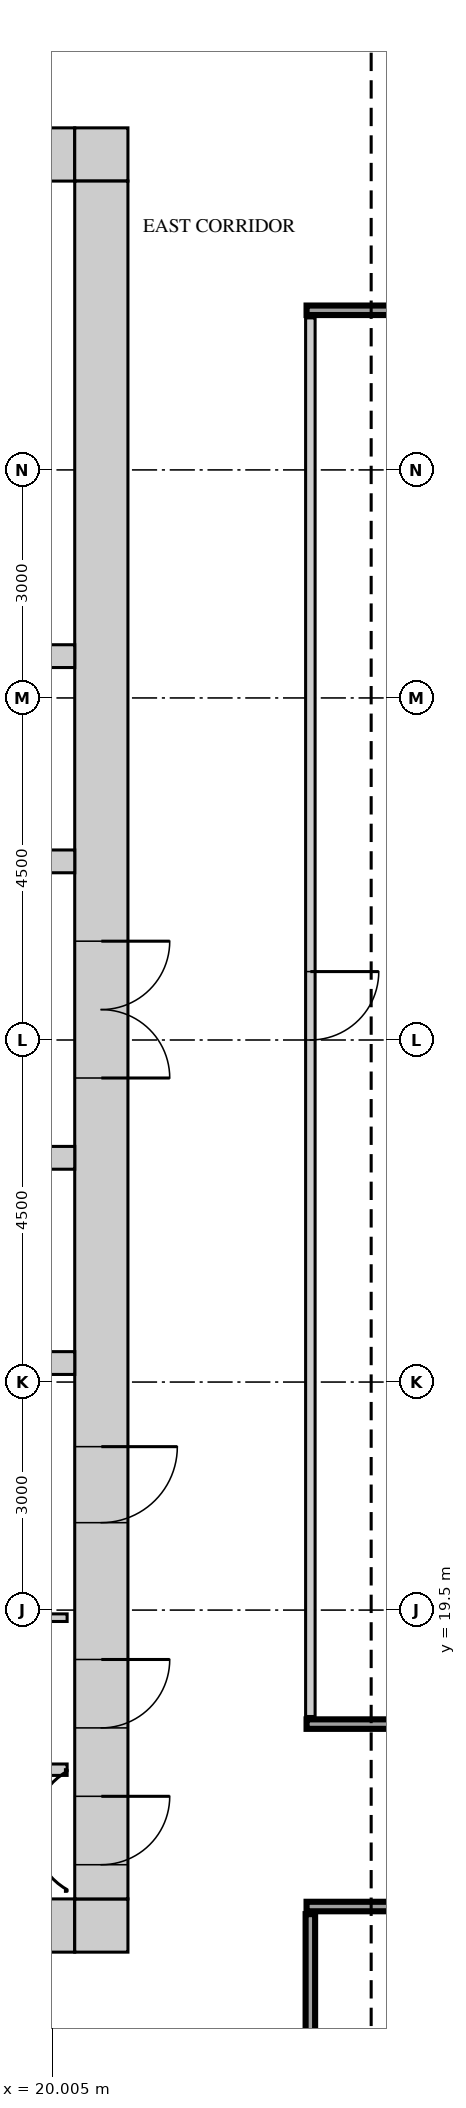
"""IFC4 building model, lengths in metres.
Left out: names, types, materials, properties, quantities, classifications, styles, units other than length and angle.
Written with IfcOpenShell. Run it as: python <this file> out.ifc"""

import sys

from ifc_helpers import new_model, si_unit, direction, frame, frame_2d, origin, place, context, subcontext, project, spatial, rectangle, extrude, source, transform, mapped, element, fill, save


model = new_model("IFC4")
c1 = context("Model", 3, precision=1e-05, world=origin(), true_north=direction((0.0, 1.0)))
c2 = subcontext(c1, "Body", "Model", "MODEL_VIEW")
j1 = project(units=[si_unit("LENGTHUNIT", "METRE"), si_unit("PLANEANGLEUNIT", "RADIAN")], contexts=[c1])
p1 = place(None, origin())
s1 = spatial("IfcSite", under=j1, at=p1, CompositionType="ELEMENT")
p2 = place(p1, origin())
s2 = spatial("IfcBuilding", under=s1, at=p2, CompositionType="ELEMENT")
p3 = place(p2, frame((0.0, 0.0, 262.2)))
s3 = spatial("IfcBuildingStorey", under=s2, at=p3, CompositionType="ELEMENT", Elevation=262.2)
m1 = source(origin(), c2, "Body", "SweptSolid", [
    extrude(rectangle(XDim=13.6, YDim=0.7, at=frame_2d((6.8, 0.0))), origin(), (0.0, 0.0, 1.0), 3.75),
])
p4 = place(p3, frame((6.7, 38.65, 0.0), z_axis=(0.0, 0.0, 1.0), x_axis=(1.0, 0.0, 0.0)))
e1 = element("IfcWall", 1, at=p4, inside=s3, PredefinedType="SHEAR", context=c2, shape_type="MappedRepresentation", body=[
    mapped(m1, transform((0.0, 0.0, 0.0))),
])
m2 = source(origin(), c2, "Body", "SweptSolid", [
    extrude(rectangle(XDim=0.9, YDim=2.1, at=frame_2d((0.45, 1.05))), frame((0.0, 0.36, 0.0), z_axis=(0.0, -1.0, 0.0), x_axis=(1.0, 0.0, 0.0)), (0.0, 0.0, 1.0), 0.72),
])
p5 = place(p4, frame((1.85, 0.0, 0.0)))
e2 = element("IfcOpeningElement", 2, at=p5, cuts=e1, PredefinedType="OPENING", context=c2, shape_type="MappedRepresentation", body=[
    mapped(m2, transform((0.0, 0.0, 0.0))),
])
p6 = place(p4, frame((8.55, 0.0, 0.0)))
e3 = element("IfcOpeningElement", 3, at=p6, cuts=e1, PredefinedType="OPENING", context=c2, shape_type="MappedRepresentation", body=[
    mapped(m2, transform((0.0, 0.0, 0.0))),
])
m3 = source(origin(), c2, "Body", "SweptSolid", [
    extrude(rectangle(XDim=0.7, YDim=0.7, at=frame_2d((0.35, 0.0))), origin(), (0.0, 0.0, 1.0), 3.75),
])
p7 = place(p3, frame((20.3, 38.65, 0.0), z_axis=(0.0, 0.0, 1.0), x_axis=(1.0, 0.0, 0.0)))
e4 = element("IfcWall", 4, at=p7, inside=s3, PredefinedType="SHEAR", context=c2, shape_type="MappedRepresentation", body=[
    mapped(m3, transform((0.0, 0.0, 0.0))),
])
p8 = place(p3, frame((6.7, 15.35, 0.0), z_axis=(0.0, 0.0, 1.0), x_axis=(1.0, 0.0, 0.0)))
e5 = element("IfcWall", 5, at=p8, inside=s3, PredefinedType="SHEAR", context=c2, shape_type="MappedRepresentation", body=[
    mapped(m1, transform((0.0, 0.0, 0.0))),
])
m4 = source(origin(), c2, "Body", "SweptSolid", [
    extrude(rectangle(XDim=1.2, YDim=2.1, at=frame_2d((0.6, 1.05))), frame((0.0, 0.36, 0.0), z_axis=(0.0, -1.0, 0.0), x_axis=(1.0, 0.0, 0.0)), (0.0, 0.0, 1.0), 0.72),
])
p9 = place(p8, frame((5.5, 0.0, 0.0)))
e6 = element("IfcOpeningElement", 6, at=p9, cuts=e5, PredefinedType="OPENING", context=c2, shape_type="MappedRepresentation", body=[
    mapped(m4, transform((0.0, 0.0, 0.0))),
])
p10 = place(p8, frame((2.15, 0.0, 0.0)))
e7 = element("IfcOpeningElement", 7, at=p10, cuts=e5, PredefinedType="OPENING", context=c2, shape_type="MappedRepresentation", body=[
    mapped(m4, transform((0.0, 0.0, 0.0))),
])
m5 = source(origin(), c2, "Body", "SweptSolid", [
    extrude(rectangle(XDim=1.0, YDim=2.1, at=frame_2d((0.5, 1.05))), frame((0.0, 0.36, 0.0), z_axis=(0.0, -1.0, 0.0), x_axis=(1.0, 0.0, 0.0)), (0.0, 0.0, 1.0), 0.72),
])
p11 = place(p8, frame((8.0, 0.0, 0.0)))
e8 = element("IfcOpeningElement", 8, at=p11, cuts=e5, PredefinedType="OPENING", context=c2, shape_type="MappedRepresentation", body=[
    mapped(m5, transform((0.0, 0.0, 0.0))),
])
p12 = place(p3, frame((20.3, 15.35, 0.0), z_axis=(0.0, 0.0, 1.0), x_axis=(1.0, 0.0, 0.0)))
e9 = element("IfcWall", 9, at=p12, inside=s3, PredefinedType="SHEAR", context=c2, shape_type="MappedRepresentation", body=[
    mapped(m3, transform((0.0, 0.0, 0.0))),
])
m6 = source(origin(), c2, "Body", "SweptSolid", [
    extrude(rectangle(XDim=22.6, YDim=0.7, at=frame_2d((11.3, 0.0))), origin(), (0.0, 0.0, 1.0), 3.75),
])
p13 = place(p3, frame((20.65, 15.7, 0.0), z_axis=(0.0, 0.0, 1.0), x_axis=(0.0, 1.0, 0.0)))
e10 = element("IfcWall", 10, at=p13, inside=s3, PredefinedType="SHEAR", context=c2, shape_type="MappedRepresentation", body=[
    mapped(m6, transform((0.0, 0.0, 0.0))),
])
m7 = source(origin(), c2, "Body", "SweptSolid", [
    extrude(rectangle(XDim=1.8, YDim=2.1, at=frame_2d((0.9, 1.05))), frame((0.0, 0.36, 0.0), z_axis=(0.0, -1.0, 0.0), x_axis=(1.0, 0.0, 0.0)), (0.0, 0.0, 1.0), 0.72),
])
p14 = place(p13, frame((10.8, 0.0, 0.0)))
e11 = element("IfcOpeningElement", 11, at=p14, cuts=e10, PredefinedType="OPENING", context=c2, shape_type="MappedRepresentation", body=[
    mapped(m7, transform((0.0, 0.0, 0.0))),
])
p15 = place(p13, frame((0.45, 0.0, 0.0)))
e12 = element("IfcOpeningElement", 12, at=p15, cuts=e10, PredefinedType="OPENING", context=c2, shape_type="MappedRepresentation", body=[
    mapped(m2, transform((0.0, 0.0, 0.0))),
])
p16 = place(p13, frame((2.25, 0.0, 0.0)))
e13 = element("IfcOpeningElement", 13, at=p16, cuts=e10, PredefinedType="OPENING", context=c2, shape_type="MappedRepresentation", body=[
    mapped(m2, transform((0.0, 0.0, 0.0))),
])
p17 = place(p13, frame((4.95, 0.0, 0.0)))
e14 = element("IfcOpeningElement", 14, at=p17, cuts=e10, PredefinedType="OPENING", context=c2, shape_type="MappedRepresentation", body=[
    mapped(m5, transform((0.0, 0.0, 0.0))),
])
m8 = source(origin(), c2, "Body", "SweptSolid", [
    extrude(rectangle(XDim=13.6, YDim=0.3, at=frame_2d((6.8, 0.0))), origin(), (0.0, 0.0, 1.0), 3.75),
])
for number, where, z_axis, x_axis in (
    (15, (6.7, 22.75, 0.0), (0.0, 0.0, 1.0), (1.0, 0.0, 0.0)),
    (16, (6.7, 32.05, 0.0), (0.0, 0.0, 1.0), (1.0, 0.0, 0.0)),
):
    element("IfcWall", number, at=place(p3, frame(where, z_axis=z_axis, x_axis=x_axis)), inside=s3, PredefinedType="STANDARD", context=c2, shape_type="MappedRepresentation", body=[
        mapped(m8, transform((0.0, 0.0, 0.0))),
    ])
p18 = place(p3, frame((6.7, 29.35, 0.0), z_axis=(0.0, 0.0, 1.0), x_axis=(1.0, 0.0, 0.0)))
e17 = element("IfcWall", 17, at=p18, inside=s3, PredefinedType="STANDARD", context=c2, shape_type="MappedRepresentation", body=[
    mapped(m8, transform((0.0, 0.0, 0.0))),
])
m9 = source(origin(), c2, "Body", "SweptSolid", [
    extrude(rectangle(XDim=1.2, YDim=2.1, at=frame_2d((0.6, 1.05))), frame((0.0, 0.16, 0.0), z_axis=(0.0, -1.0, 0.0), x_axis=(1.0, 0.0, 0.0)), (0.0, 0.0, 1.0), 0.32),
])
p19 = place(p18, frame((1.05, 0.0, 0.0)))
e18 = element("IfcOpeningElement", 18, at=p19, cuts=e17, PredefinedType="OPENING", context=c2, shape_type="MappedRepresentation", body=[
    mapped(m9, transform((0.0, 0.0, 0.0))),
])
p20 = place(p18, frame((3.6, 0.0, 0.0)))
e19 = element("IfcOpeningElement", 19, at=p20, cuts=e17, PredefinedType="OPENING", context=c2, shape_type="MappedRepresentation", body=[
    mapped(m9, transform((0.0, 0.0, 0.0))),
])
p21 = place(p18, frame((6.15, 0.0, 0.0)))
e20 = element("IfcOpeningElement", 20, at=p21, cuts=e17, PredefinedType="OPENING", context=c2, shape_type="MappedRepresentation", body=[
    mapped(m9, transform((0.0, 0.0, 0.0))),
])
p22 = place(p3, frame((6.7, 25.45, 0.0), z_axis=(0.0, 0.0, 1.0), x_axis=(1.0, 0.0, 0.0)))
e21 = element("IfcWall", 21, at=p22, inside=s3, PredefinedType="STANDARD", context=c2, shape_type="MappedRepresentation", body=[
    mapped(m8, transform((0.0, 0.0, 0.0))),
])
p23 = place(p22, frame((1.05, 0.0, 0.0)))
e22 = element("IfcOpeningElement", 22, at=p23, cuts=e21, PredefinedType="OPENING", context=c2, shape_type="MappedRepresentation", body=[
    mapped(m9, transform((0.0, 0.0, 0.0))),
])
p24 = place(p22, frame((3.6, 0.0, 0.0)))
e23 = element("IfcOpeningElement", 23, at=p24, cuts=e21, PredefinedType="OPENING", context=c2, shape_type="MappedRepresentation", body=[
    mapped(m9, transform((0.0, 0.0, 0.0))),
])
p25 = place(p22, frame((6.15, 0.0, 0.0)))
e24 = element("IfcOpeningElement", 24, at=p25, cuts=e21, PredefinedType="OPENING", context=c2, shape_type="MappedRepresentation", body=[
    mapped(m9, transform((0.0, 0.0, 0.0))),
])
m10 = source(origin(), c2, "Body", "SweptSolid", [
    extrude(rectangle(XDim=10.85, YDim=0.125, at=frame_2d((5.425, 0.0))), origin(), (0.0, 0.0, 1.0), 3.8),
])
p26 = place(p3, frame((23.4, 4.65, 0.0), z_axis=(0.0, 0.0, 1.0), x_axis=(0.0, 1.0, 0.0)))
e25 = element("IfcWall", 25, at=p26, inside=s3, PredefinedType="PARTITIONING", context=c2, shape_type="MappedRepresentation", body=[
    mapped(m10, transform((0.0, 0.0, 0.0))),
])
m11 = source(origin(), c2, "Body", "SweptSolid", [
    extrude(rectangle(XDim=0.9, YDim=2.1, at=frame_2d((0.45, 1.05))), frame((0.0, 0.073, 0.0), z_axis=(0.0, -1.0, 0.0), x_axis=(1.0, 0.0, 0.0)), (0.0, 0.0, 1.0), 0.145),
])
p27 = place(p26, frame((4.5, 0.0, 0.0)))
e26 = element("IfcOpeningElement", 26, at=p27, cuts=e25, PredefinedType="OPENING", context=c2, shape_type="MappedRepresentation", body=[
    mapped(m11, transform((0.0, 0.0, 0.0))),
])
m12 = source(origin(), c2, "Body", "SweptSolid", [
    extrude(rectangle(XDim=26.0, YDim=0.125, at=frame_2d((13.0, 0.0))), origin(), (0.0, 0.0, 1.0), 3.8),
])
p28 = place(p3, frame((23.35, 15.6, 0.0), z_axis=(0.0, 0.0, 1.0), x_axis=(1.0, 0.0, 0.0)))
e27 = element("IfcWall", 27, at=p28, inside=s3, PredefinedType="PARTITIONING", context=c2, shape_type="MappedRepresentation", body=[
    mapped(m12, transform((0.0, 0.0, 0.0))),
])
m13 = source(origin(), c2, "Body", "SweptSolid", [
    extrude(rectangle(XDim=1.2, YDim=2.1, at=frame_2d((0.6, 1.05))), frame((0.0, 0.073, 0.0), z_axis=(0.0, -1.0, 0.0), x_axis=(1.0, 0.0, 0.0)), (0.0, 0.0, 1.0), 0.145),
])
p29 = place(p28, frame((16.55, 0.0, 0.0)))
e28 = element("IfcOpeningElement", 28, at=p29, cuts=e27, PredefinedType="OPENING", context=c2, shape_type="MappedRepresentation", body=[
    mapped(m13, transform((0.0, 0.0, 0.0))),
])
m14 = source(origin(), c2, "Body", "SweptSolid", [
    extrude(rectangle(XDim=4.0, YDim=0.15, at=frame_2d((2.0, 0.0))), origin(), (0.0, 0.0, 1.0), 3.8),
])
p30 = place(p3, frame((16.2, 17.4, 0.0), z_axis=(0.0, 0.0, 1.0), x_axis=(1.0, 0.0, 0.0)))
e29 = element("IfcWall", 29, at=p30, inside=s3, PredefinedType="PARTITIONING", context=c2, shape_type="MappedRepresentation", body=[
    mapped(m14, transform((0.0, 0.0, 0.0))),
])
p31 = place(p3, frame((23.35, 18.0, 0.0), z_axis=(0.0, 0.0, 1.0), x_axis=(1.0, 0.0, 0.0)))
e30 = element("IfcWall", 30, at=p31, inside=s3, PredefinedType="PARTITIONING", context=c2, shape_type="MappedRepresentation", body=[
    mapped(m12, transform((0.0, 0.0, 0.0))),
])
p32 = place(p31, frame((8.5, 0.0, 0.0)))
e31 = element("IfcOpeningElement", 31, at=p32, cuts=e30, PredefinedType="OPENING", context=c2, shape_type="MappedRepresentation", body=[
    mapped(m13, transform((0.0, 0.0, 0.0))),
])
p33 = place(p31, frame((15.3, 0.0, 0.0)))
e32 = element("IfcOpeningElement", 32, at=p33, cuts=e30, PredefinedType="OPENING", context=c2, shape_type="MappedRepresentation", body=[
    mapped(m11, transform((0.0, 0.0, 0.0))),
])
p34 = place(p31, frame((21.8, 0.0, 0.0)))
e33 = element("IfcOpeningElement", 33, at=p34, cuts=e30, PredefinedType="OPENING", context=c2, shape_type="MappedRepresentation", body=[
    mapped(m13, transform((0.0, 0.0, 0.0))),
])
m15 = source(origin(), c2, "Body", "SweptSolid", [
    extrude(rectangle(XDim=18.4, YDim=0.125, at=frame_2d((9.2, 0.0))), origin(), (0.0, 0.0, 1.0), 3.8),
])
p35 = place(p3, frame((23.4, 18.1, 0.0), z_axis=(0.0, 0.0, 1.0), x_axis=(0.0, 1.0, 0.0)))
e34 = element("IfcWall", 34, at=p35, inside=s3, PredefinedType="PARTITIONING", context=c2, shape_type="MappedRepresentation", body=[
    mapped(m15, transform((0.0, 0.0, 0.0))),
])
p36 = place(p35, frame((8.9, 0.0, 0.0)))
e35 = element("IfcOpeningElement", 35, at=p36, cuts=e34, PredefinedType="OPENING", context=c2, shape_type="MappedRepresentation", body=[
    mapped(m11, transform((0.0, 0.0, 0.0))),
])
m16 = source(origin(), c2, "Body", "SweptSolid", [
    extrude(rectangle(XDim=4.1, YDim=0.1, at=frame_2d((2.05, 0.0))), origin(), (0.0, 0.0, 1.0), 3.8),
])
p37 = place(p3, frame((16.1, 19.4, 0.0), z_axis=(0.0, 0.0, 1.0), x_axis=(1.0, 0.0, 0.0)))
e36 = element("IfcWall", 36, at=p37, inside=s3, PredefinedType="PARTITIONING", context=c2, shape_type="MappedRepresentation", body=[
    mapped(m16, transform((0.0, 0.0, 0.0))),
])
p38 = place(p3, frame((23.35, 36.6, 0.0), z_axis=(0.0, 0.0, 1.0), x_axis=(1.0, 0.0, 0.0)))
e37 = element("IfcWall", 37, at=p38, inside=s3, PredefinedType="PARTITIONING", context=c2, shape_type="MappedRepresentation", body=[
    mapped(m12, transform((0.0, 0.0, 0.0))),
])
m17 = source(origin(), c2, "Body", "SweptSolid", [
    extrude(rectangle(XDim=1.8, YDim=2.1, at=frame_2d((0.9, 1.05))), frame((0.0, 0.3, 0.0), z_axis=(0.0, -1.0, 0.0), x_axis=(1.0, 0.0, 0.0)), (0.0, 0.0, 1.0), 0.6),
])
p39 = place(p14, origin())
e38 = element("IfcDoor", 38, at=p39, inside=s3, OperationType="DOUBLE_DOOR_SINGLE_SWING", PredefinedType="DOOR", context=c2, shape_type="MappedRepresentation", body=[
    mapped(m17, transform((0.0, 0.0, 0.0))),
])
fill(e11, e38)
m18 = source(origin(), c2, "Body", "SweptSolid", [
    extrude(rectangle(XDim=0.9, YDim=2.1, at=frame_2d((0.45, 1.05))), frame((0.0, 0.3, 0.0), z_axis=(0.0, -1.0, 0.0), x_axis=(1.0, 0.0, 0.0)), (0.0, 0.0, 1.0), 0.6),
])
p40 = place(p15, origin())
e39 = element("IfcDoor", 39, at=p40, inside=s3, OperationType="SINGLE_SWING_RIGHT", PredefinedType="DOOR", context=c2, shape_type="MappedRepresentation", body=[
    mapped(m18, transform((0.0, 0.0, 0.0))),
])
fill(e12, e39)
p41 = place(p16, origin())
e40 = element("IfcDoor", 40, at=p41, inside=s3, OperationType="SINGLE_SWING_RIGHT", PredefinedType="DOOR", context=c2, shape_type="MappedRepresentation", body=[
    mapped(m18, transform((0.0, 0.0, 0.0))),
])
fill(e13, e40)
m19 = source(origin(), c2, "Body", "SweptSolid", [
    extrude(rectangle(XDim=1.0, YDim=2.1, at=frame_2d((0.5, 1.05))), frame((0.0, 0.3, 0.0), z_axis=(0.0, -1.0, 0.0), x_axis=(1.0, 0.0, 0.0)), (0.0, 0.0, 1.0), 0.6),
])
p42 = place(p17, origin())
e41 = element("IfcDoor", 41, at=p42, inside=s3, OperationType="SINGLE_SWING_RIGHT", PredefinedType="DOOR", context=c2, shape_type="MappedRepresentation", body=[
    mapped(m19, transform((0.0, 0.0, 0.0))),
])
fill(e14, e41)
m20 = source(origin(), c2, "Body", "SweptSolid", [
    extrude(rectangle(XDim=0.9, YDim=2.1, at=frame_2d((0.45, 1.05))), frame((0.0, 0.025, 0.0), z_axis=(0.0, -1.0, 0.0), x_axis=(1.0, 0.0, 0.0)), (0.0, 0.0, 1.0), 0.05),
])
p43 = place(p36, origin())
e42 = element("IfcDoor", 42, at=p43, inside=s3, OperationType="SINGLE_SWING_RIGHT", PredefinedType="DOOR", context=c2, shape_type="MappedRepresentation", body=[
    mapped(m20, transform((0.0, 0.0, 0.0))),
])
fill(e35, e42)
save(model, sys.argv[1])
